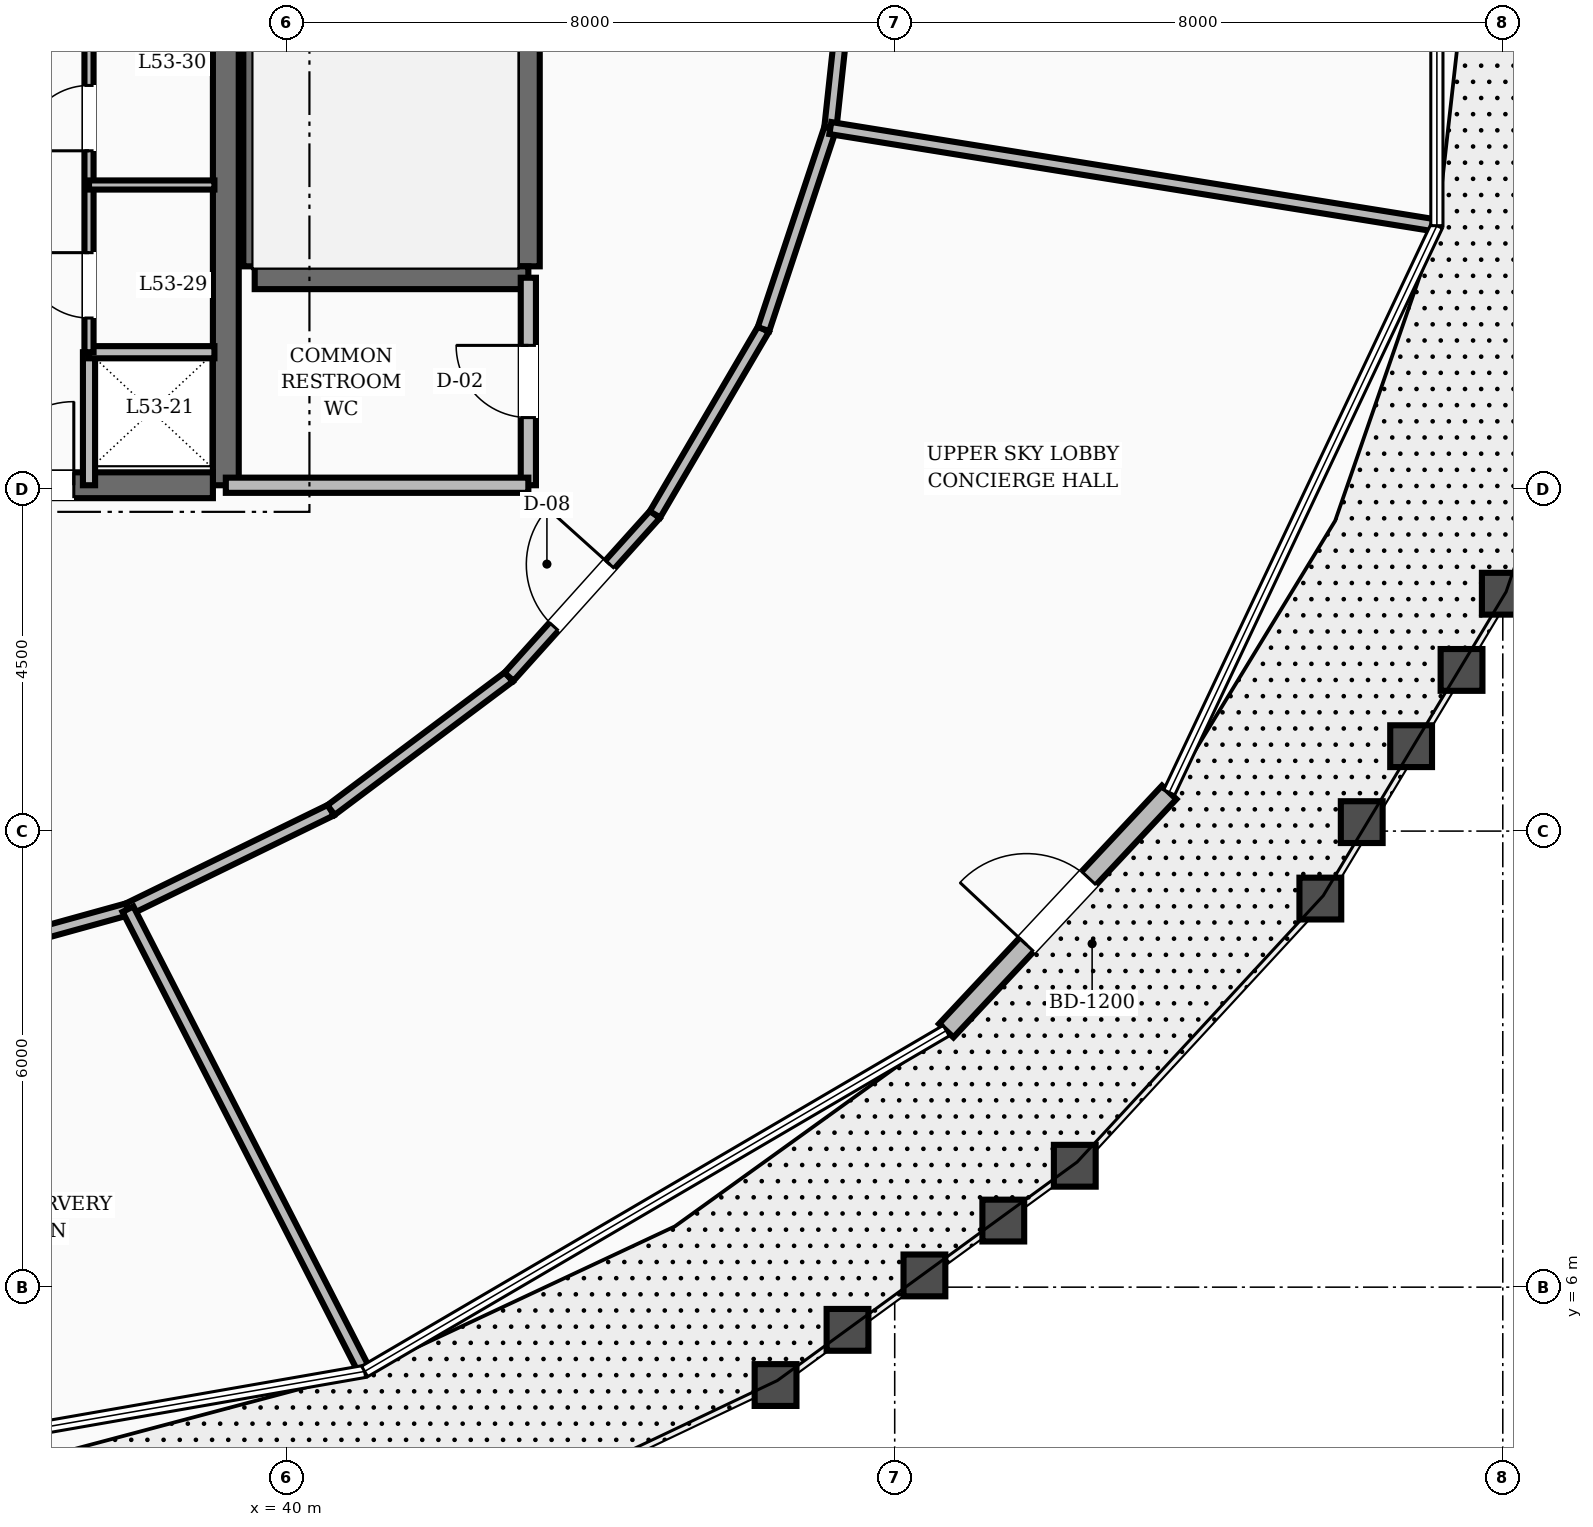
"""IFC4 building model, lengths in metres.
Left out: names, types, materials, properties, quantities, classifications, styles, units other than length and angle.
Written with IfcOpenShell. Run it as: python <this file> out.ifc"""

import sys

from ifc_helpers import new_model, si_unit, direction, frame, frame_2d, origin, place, context, subcontext, project, spatial, rectangle, extrude, element, fill, save


model = new_model("IFC4")
c1 = context("Model", 3, precision=1e-05, world=origin(), true_north=direction((0.0, 1.0)))
c2 = subcontext(c1, "Body", "Model", "MODEL_VIEW")
j1 = project(units=[si_unit("LENGTHUNIT", "METRE"), si_unit("PLANEANGLEUNIT", "RADIAN")], contexts=[c1])
p1 = place(None, origin())
s1 = spatial("IfcSite", under=j1, at=p1, CompositionType="ELEMENT")
p2 = place(p1, origin())
s2 = spatial("IfcBuilding", under=s1, at=p2, CompositionType="ELEMENT")
p3 = place(p2, frame((0.0, 0.0, 203.6)))
s3 = spatial("IfcBuildingStorey", under=s2, at=p3, CompositionType="ELEMENT", Elevation=203.6)
p4 = place(p3, frame((39.2, 16.55, 0.0), z_axis=(0.0, 0.0, 1.0), x_axis=(0.0, 1.0, 0.0)))
e1 = element("IfcWall", 1, at=p4, inside=s3, PredefinedType="SHEAR", context=c2, shape_type="SweptSolid", body=[
    extrude(rectangle(XDim=6.3, YDim=0.34, at=frame_2d((3.15, 0.0))), origin(), (0.0, 0.0, 1.0), 4.8),
])
p5 = place(p3, frame((35.8, 16.55, 0.0), z_axis=(0.0, 0.0, 1.0), x_axis=(1.0, 0.0, 0.0)))
e2 = element("IfcWall", 2, at=p5, inside=s3, PredefinedType="SHEAR", context=c2, shape_type="SweptSolid", body=[
    extrude(rectangle(XDim=3.23, YDim=0.34, at=frame_2d((1.615, 0.0))), origin(), (0.0, 0.0, 1.0), 4.8),
])
p6 = place(p5, frame((0.3, 0.0, 0.0)))
e3 = element("IfcOpeningElement", 3, at=p6, cuts=e2, PredefinedType="OPENING", context=c2, shape_type="SweptSolid", body=[
    extrude(rectangle(XDim=1.1, YDim=2.1, at=frame_2d((0.55, 1.05))), frame((0.0, 0.18, 0.0), z_axis=(0.0, -1.0, 0.0), x_axis=(1.0, 0.0, 0.0)), (0.0, 0.0, 1.0), 0.36),
])
for number, where, z_axis, x_axis in (
    (4, (43.18, 19.43, 0.0), (0.0, 0.0, 1.0), (0.0, 1.0, 0.0)),
    (5, (39.58, 19.43, 0.0), (0.0, 0.0, 1.0), (0.0, 1.0, 0.0)),
):
    element("IfcWall", number, at=place(p3, frame(where, z_axis=z_axis, x_axis=x_axis)), inside=s3, PredefinedType="SHEAR", context=c2, shape_type="SweptSolid", body=[
        extrude(rectangle(XDim=8.74, YDim=0.3, at=frame_2d((4.37, 0.0))), origin(), (0.0, 0.0, 1.0), 4.8),
    ])
p7 = place(p3, frame((39.58, 19.28, 0.0), z_axis=(0.0, 0.0, 1.0), x_axis=(1.0, 0.0, 0.0)))
e6 = element("IfcWall", 6, at=p7, inside=s3, PredefinedType="SHEAR", context=c2, shape_type="SweptSolid", body=[
    extrude(rectangle(XDim=3.6, YDim=0.3, at=frame_2d((1.8, 0.0))), origin(), (0.0, 0.0, 1.0), 4.8),
])
p8 = place(p3, frame((48.678, 9.375, 0.0), z_axis=(0.0, 0.0, 1.0), x_axis=(0.683314643828, 0.730124028868, 0.0)))
e7 = element("IfcWall", 7, at=p8, inside=s3, PredefinedType="STANDARD", context=c2, shape_type="SweptSolid", body=[
    extrude(rectangle(XDim=4.292, YDim=0.26, at=frame_2d((2.146, 0.0))), origin(), (0.0, 0.0, 1.0), 3.71),
])
p9 = place(p8, frame((1.546, 0.0, 0.0)))
e8 = element("IfcOpeningElement", 8, at=p9, cuts=e7, PredefinedType="OPENING", context=c2, shape_type="SweptSolid", body=[
    extrude(rectangle(XDim=1.2, YDim=2.15, at=frame_2d((0.6, 1.075))), frame((0.0, 0.14, 0.0), z_axis=(0.0, -1.0, 0.0), x_axis=(1.0, 0.0, 0.0)), (0.0, 0.0, 1.0), 0.28),
])
p10 = place(p3, frame((43.18, 16.55, 0.0), z_axis=(0.0, 0.0, 1.0), x_axis=(0.0, 1.0, 0.0)))
e9 = element("IfcWall", 9, at=p10, inside=s3, PredefinedType="SOLIDWALL", context=c2, shape_type="SweptSolid", body=[
    extrude(rectangle(XDim=2.73, YDim=0.2, at=frame_2d((1.365, 0.0))), origin(), (0.0, 0.0, 1.0), 3.71),
])
p11 = place(p10, frame((0.89, 0.0, 0.0)))
e10 = element("IfcOpeningElement", 10, at=p11, cuts=e9, PredefinedType="OPENING", context=c2, shape_type="SweptSolid", body=[
    extrude(rectangle(XDim=0.95, YDim=2.1, at=frame_2d((0.475, 1.05))), frame((0.0, 0.11, 0.0), z_axis=(0.0, -1.0, 0.0), x_axis=(1.0, 0.0, 0.0)), (0.0, 0.0, 1.0), 0.22),
])
p12 = place(p3, frame((39.2, 16.55, 0.0), z_axis=(0.0, 0.0, 1.0), x_axis=(1.0, 0.0, 0.0)))
e11 = element("IfcWall", 11, at=p12, inside=s3, PredefinedType="SOLIDWALL", context=c2, shape_type="SweptSolid", body=[
    extrude(rectangle(XDim=3.98, YDim=0.2, at=frame_2d((1.99, 0.0))), origin(), (0.0, 0.0, 1.0), 3.71),
])
p13 = place(p3, frame((37.4, 16.55, 0.0), z_axis=(0.0, 0.0, 1.0), x_axis=(0.0, 1.0, 0.0)))
e12 = element("IfcWall", 12, at=p13, inside=s3, PredefinedType="SOLIDWALL", context=c2, shape_type="SweptSolid", body=[
    extrude(rectangle(XDim=1.75, YDim=0.16, at=frame_2d((0.875, 0.0))), origin(), (0.0, 0.0, 1.0), 3.71),
])
p14 = place(p3, frame((37.4, 18.3, 0.0), z_axis=(0.0, 0.0, 1.0), x_axis=(1.0, 0.0, 0.0)))
e13 = element("IfcWall", 13, at=p14, inside=s3, PredefinedType="SOLIDWALL", context=c2, shape_type="SweptSolid", body=[
    extrude(rectangle(XDim=1.65, YDim=0.16, at=frame_2d((0.825, 0.0))), origin(), (0.0, 0.0, 1.0), 3.71),
])
p15 = place(p3, frame((37.4, 18.3, 0.0), z_axis=(0.0, 0.0, 1.0), x_axis=(0.0, 1.0, 0.0)))
e14 = element("IfcWall", 14, at=p15, inside=s3, PredefinedType="PARTITIONING", context=c2, shape_type="SweptSolid", body=[
    extrude(rectangle(XDim=4.45, YDim=0.12, at=frame_2d((2.225, 0.0))), origin(), (0.0, 0.0, 1.0), 3.71),
])
p16 = place(p15, frame((0.45, 0.0, 0.0)))
e15 = element("IfcOpeningElement", 15, at=p16, cuts=e14, PredefinedType="OPENING", context=c2, shape_type="SweptSolid", body=[
    extrude(rectangle(XDim=0.86, YDim=2.1, at=frame_2d((0.43, 1.05))), frame((0.0, 0.07, 0.0), z_axis=(0.0, -1.0, 0.0), x_axis=(1.0, 0.0, 0.0)), (0.0, 0.0, 1.0), 0.14),
])
p17 = place(p15, frame((2.65, 0.0, 0.0)))
e16 = element("IfcOpeningElement", 16, at=p17, cuts=e14, PredefinedType="OPENING", context=c2, shape_type="SweptSolid", body=[
    extrude(rectangle(XDim=0.86, YDim=2.1, at=frame_2d((0.43, 1.05))), frame((0.0, 0.07, 0.0), z_axis=(0.0, -1.0, 0.0), x_axis=(1.0, 0.0, 0.0)), (0.0, 0.0, 1.0), 0.14),
])
p18 = place(p3, frame((37.4, 20.5, 0.0), z_axis=(0.0, 0.0, 1.0), x_axis=(1.0, 0.0, 0.0)))
e17 = element("IfcWall", 17, at=p18, inside=s3, PredefinedType="PARTITIONING", context=c2, shape_type="SweptSolid", body=[
    extrude(rectangle(XDim=1.65, YDim=0.12, at=frame_2d((0.825, 0.0))), origin(), (0.0, 0.0, 1.0), 3.71),
])
p19 = place(p3, frame((35.014, 10.171, 0.0), z_axis=(0.0, 0.0, 1.0), x_axis=(0.963743190464, 0.26683152519, 0.0)))
e18 = element("IfcWall", 18, at=p19, inside=s3, PredefinedType="SOLIDWALL", context=c2, shape_type="SweptSolid", body=[
    extrude(rectangle(XDim=3.008, YDim=0.16, at=frame_2d((1.504, 0.0))), origin(), (0.0, 0.0, 1.0), 3.71),
])
p20 = place(p3, frame((37.913, 10.973, 0.0), z_axis=(0.0, 0.0, 1.0), x_axis=(0.898755022802, 0.438451147778, 0.0)))
e19 = element("IfcWall", 19, at=p20, inside=s3, PredefinedType="SOLIDWALL", context=c2, shape_type="SweptSolid", body=[
    extrude(rectangle(XDim=2.972, YDim=0.16, at=frame_2d((1.486, 0.0))), origin(), (0.0, 0.0, 1.0), 3.71),
])
p21 = place(p3, frame((40.583, 12.276, 0.0), z_axis=(0.0, 0.0, 1.0), x_axis=(0.800420462314, 0.599438973966, 0.0)))
e20 = element("IfcWall", 20, at=p21, inside=s3, PredefinedType="SOLIDWALL", context=c2, shape_type="SweptSolid", body=[
    extrude(rectangle(XDim=2.925, YDim=0.16, at=frame_2d((1.462, 0.0))), origin(), (0.0, 0.0, 1.0), 3.71),
])
p22 = place(p3, frame((42.925, 14.03, 0.0), z_axis=(0.0, 0.0, 1.0), x_axis=(0.668645478294, 0.743581350194, 0.0)))
e21 = element("IfcWall", 21, at=p22, inside=s3, PredefinedType="SOLIDWALL", context=c2, shape_type="SweptSolid", body=[
    extrude(rectangle(XDim=2.874, YDim=0.16, at=frame_2d((1.437, 0.0))), origin(), (0.0, 0.0, 1.0), 3.71),
])
p23 = place(p22, frame((0.887, 0.0, 0.0)))
e22 = element("IfcOpeningElement", 22, at=p23, cuts=e21, PredefinedType="OPENING", context=c2, shape_type="SweptSolid", body=[
    extrude(rectangle(XDim=1.1, YDim=2.1, at=frame_2d((0.55, 1.05))), frame((0.0, 0.09, 0.0), z_axis=(0.0, -1.0, 0.0), x_axis=(1.0, 0.0, 0.0)), (0.0, 0.0, 1.0), 0.18),
])
p24 = place(p3, frame((44.846, 16.167, 0.0), z_axis=(0.0, 0.0, 1.0), x_axis=(0.505380130961, 0.862896820732, 0.0)))
e23 = element("IfcWall", 23, at=p24, inside=s3, PredefinedType="SOLIDWALL", context=c2, shape_type="SweptSolid", body=[
    extrude(rectangle(XDim=2.825, YDim=0.16, at=frame_2d((1.413, 0.0))), origin(), (0.0, 0.0, 1.0), 3.71),
])
p25 = place(p3, frame((46.274, 18.604, 0.0), z_axis=(0.0, 0.0, 1.0), x_axis=(0.315413058649, 0.948954478589, 0.0)))
e24 = element("IfcWall", 24, at=p25, inside=s3, PredefinedType="SOLIDWALL", context=c2, shape_type="SweptSolid", body=[
    extrude(rectangle(XDim=2.787, YDim=0.16, at=frame_2d((1.394, 0.0))), origin(), (0.0, 0.0, 1.0), 3.71),
])
p26 = place(p3, frame((47.153, 21.249, 0.0), z_axis=(0.0, 0.0, 1.0), x_axis=(0.107302680622, 0.994226400138, 0.0)))
e25 = element("IfcWall", 25, at=p26, inside=s3, PredefinedType="SOLIDWALL", context=c2, shape_type="SweptSolid", body=[
    extrude(rectangle(XDim=2.767, YDim=0.16, at=frame_2d((1.383, 0.0))), origin(), (0.0, 0.0, 1.0), 3.71),
])
p27 = place(p3, frame((37.913, 10.973, 0.0), z_axis=(0.0, 0.0, 1.0), x_axis=(0.455654930069, -0.890156494502, 0.0)))
e26 = element("IfcWall", 26, at=p27, inside=s3, PredefinedType="SOLIDWALL", context=c2, shape_type="SweptSolid", body=[
    extrude(rectangle(XDim=6.833, YDim=0.16, at=frame_2d((3.416, 0.0))), origin(), (0.0, 0.0, 1.0), 3.71),
])
p28 = place(p3, frame((47.153, 21.249, 0.0), z_axis=(0.0, 0.0, 1.0), x_axis=(0.987292230492, -0.158915234041, 0.0)))
e27 = element("IfcWall", 27, at=p28, inside=s3, PredefinedType="SOLIDWALL", context=c2, shape_type="SweptSolid", body=[
    extrude(rectangle(XDim=8.083, YDim=0.16, at=frame_2d((4.041, 0.0))), origin(), (0.0, 0.0, 1.0), 3.71),
])
p29 = place(p9, origin())
e28 = element("IfcDoor", 28, at=p29, inside=s3, OperationType="SINGLE_SWING_LEFT", PredefinedType="DOOR", context=c2, shape_type="SweptSolid", body=[
    extrude(rectangle(XDim=1.2, YDim=2.15, at=frame_2d((0.6, 1.075))), frame((0.0, 0.025, 0.0), z_axis=(0.0, -1.0, 0.0), x_axis=(1.0, 0.0, 0.0)), (0.0, 0.0, 1.0), 0.05),
])
fill(e8, e28)
p30 = place(p11, origin())
e29 = element("IfcDoor", 29, at=p30, inside=s3, OperationType="SINGLE_SWING_RIGHT", PredefinedType="DOOR", context=c2, shape_type="SweptSolid", body=[
    extrude(rectangle(XDim=0.95, YDim=2.1, at=frame_2d((0.475, 1.05))), frame((0.0, 0.025, 0.0), z_axis=(0.0, -1.0, 0.0), x_axis=(1.0, 0.0, 0.0)), (0.0, 0.0, 1.0), 0.05),
])
fill(e10, e29)
p31 = place(p6, origin())
e30 = element("IfcDoor", 30, at=p31, inside=s3, OperationType="SINGLE_SWING_RIGHT", PredefinedType="DOOR", context=c2, shape_type="SweptSolid", body=[
    extrude(rectangle(XDim=1.1, YDim=2.1, at=frame_2d((0.55, 1.05))), frame((0.0, 0.025, 0.0), z_axis=(0.0, -1.0, 0.0), x_axis=(1.0, 0.0, 0.0)), (0.0, 0.0, 1.0), 0.05),
])
fill(e3, e30)
p32 = place(p16, origin())
e31 = element("IfcDoor", 31, at=p32, inside=s3, OperationType="SINGLE_SWING_RIGHT", PredefinedType="DOOR", context=c2, shape_type="SweptSolid", body=[
    extrude(rectangle(XDim=0.86, YDim=2.1, at=frame_2d((0.43, 1.05))), frame((0.0, 0.025, 0.0), z_axis=(0.0, -1.0, 0.0), x_axis=(1.0, 0.0, 0.0)), (0.0, 0.0, 1.0), 0.05),
])
fill(e15, e31)
p33 = place(p17, origin())
e32 = element("IfcDoor", 32, at=p33, inside=s3, OperationType="SINGLE_SWING_LEFT", PredefinedType="DOOR", context=c2, shape_type="SweptSolid", body=[
    extrude(rectangle(XDim=0.86, YDim=2.1, at=frame_2d((0.43, 1.05))), frame((0.0, 0.025, 0.0), z_axis=(0.0, -1.0, 0.0), x_axis=(1.0, 0.0, 0.0)), (0.0, 0.0, 1.0), 0.05),
])
fill(e16, e32)
p34 = place(p23, origin())
e33 = element("IfcDoor", 33, at=p34, inside=s3, OperationType="SINGLE_SWING_RIGHT", PredefinedType="DOOR", context=c2, shape_type="SweptSolid", body=[
    extrude(rectangle(XDim=1.1, YDim=2.1, at=frame_2d((0.55, 1.05))), frame((0.0, 0.025, 0.0), z_axis=(0.0, -1.0, 0.0), x_axis=(1.0, 0.0, 0.0)), (0.0, 0.0, 1.0), 0.05),
])
fill(e22, e33)
save(model, sys.argv[1])
